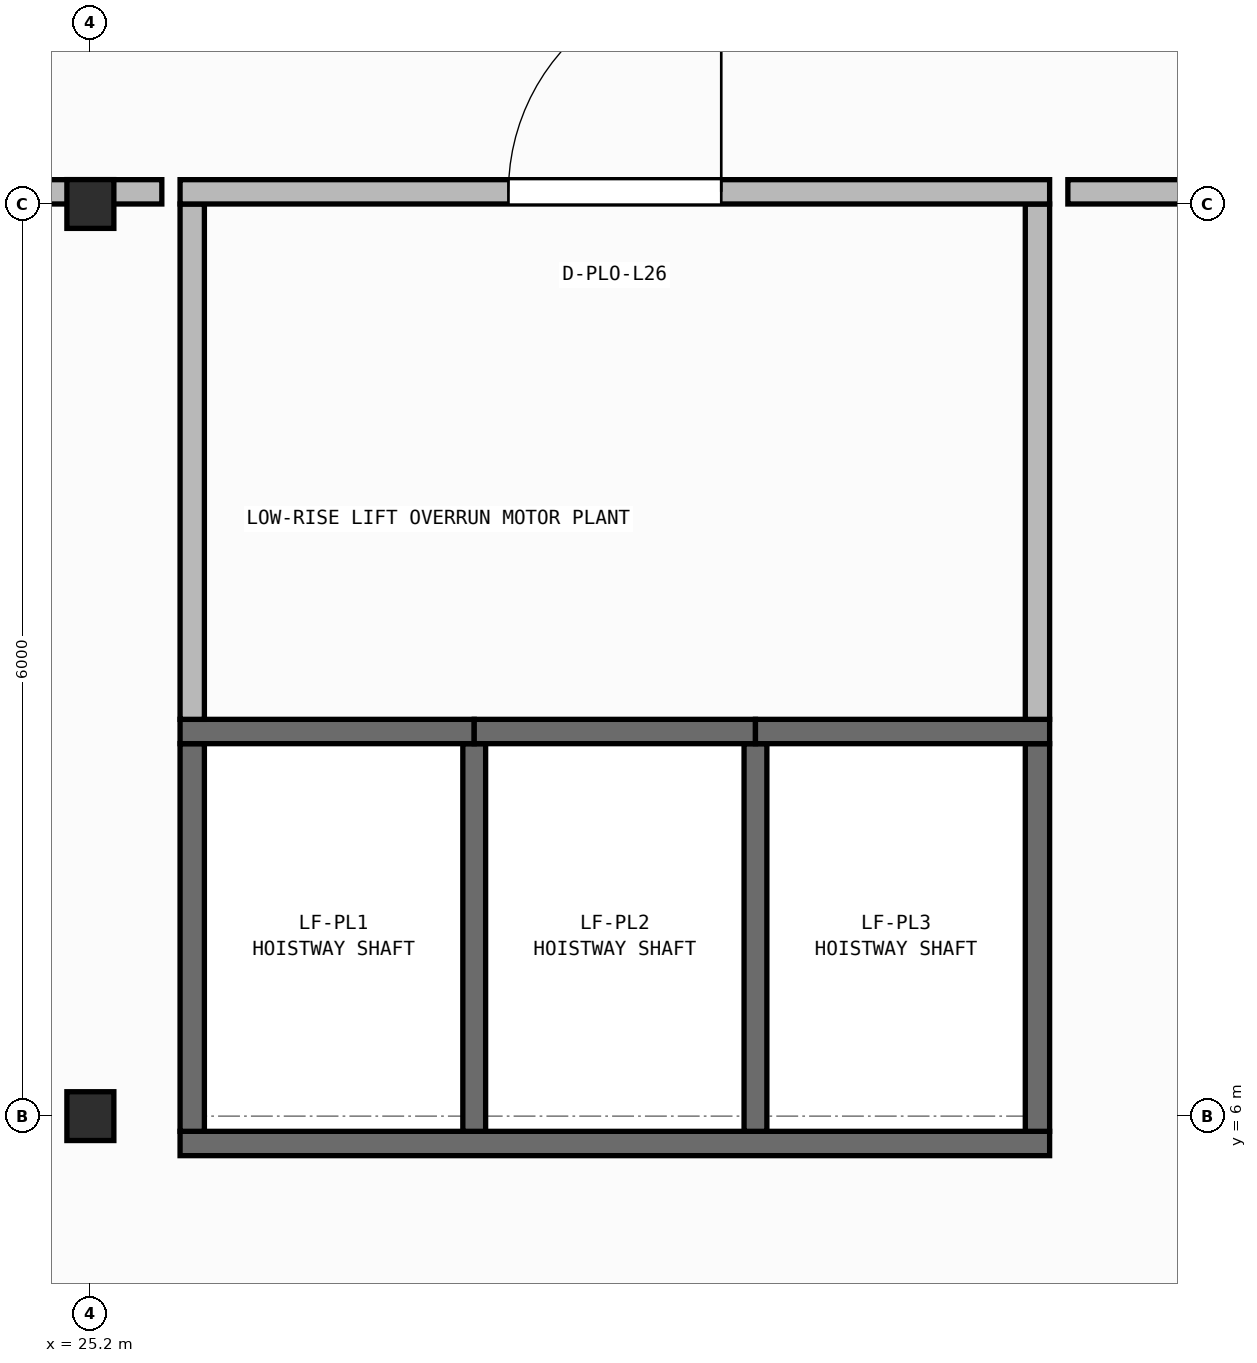
"""IFC4 building model, lengths in metres.
Left out: names, types, materials, properties, quantities, classifications, styles, units other than length and angle.
Written with IfcOpenShell. Run it as: python <this file> out.ifc"""

import sys

from ifc_helpers import new_model, si_unit, direction, frame, frame_2d, origin, origin_2d, place, context, subcontext, project, spatial, rectangle, i_section, extrude, element, fill, save


model = new_model("IFC4")
c1 = context("Model", 3, precision=1e-05, world=origin(), true_north=direction((0.0, 1.0)))
c2 = subcontext(c1, "Body", "Model", "MODEL_VIEW")
j1 = project(units=[si_unit("LENGTHUNIT", "METRE"), si_unit("PLANEANGLEUNIT", "RADIAN")], contexts=[c1])
p1 = place(None, origin())
s1 = spatial("IfcSite", under=j1, at=p1, CompositionType="ELEMENT")
p2 = place(p1, origin())
s2 = spatial("IfcBuilding", under=s1, at=p2, CompositionType="ELEMENT")
p3 = place(p2, frame((0.0, 0.0, 107.3)))
s3 = spatial("IfcBuildingStorey", under=s2, at=p3, CompositionType="ELEMENT", Elevation=107.3)
for number, where, z_axis, x_axis in (
    (1, (25.2, 6.0, 0.0), (0.0, 0.0, 1.0), (1.0, 0.0, 0.0)),
    (2, (25.2, 12.0, 0.0), (0.0, 0.0, 1.0), (1.0, 0.0, 0.0)),
):
    element("IfcColumn", number, at=place(p3, frame(where, z_axis=z_axis, x_axis=x_axis)), inside=s3, PredefinedType="COLUMN", context=c2, shape_type="SweptSolid", body=[
        extrude(i_section(OverallWidth=0.309, OverallDepth=0.321, WebThickness=0.014, FlangeThickness=0.022, FilletRadius=0.017, at=origin_2d()), origin(), (0.0, 0.0, 1.0), 3.95),
    ])
p4 = place(p3, frame((25.79, 5.82, 0.0), z_axis=(0.0, 0.0, 1.0), x_axis=(1.0, 0.0, 0.0)))
e3 = element("IfcWall", 3, at=p4, inside=s3, PredefinedType="SHEAR", context=c2, shape_type="SweptSolid", body=[
    extrude(rectangle(XDim=5.72, YDim=0.16, at=frame_2d((2.86, 0.0))), origin(), (0.0, 0.0, 1.0), 3.71),
])
for number, where, z_axis, x_axis in (
    (4, (25.87, 5.9, 0.0), (0.0, 0.0, 1.0), (0.0, 1.0, 0.0)),
    (5, (31.43, 5.9, 0.0), (0.0, 0.0, 1.0), (0.0, 1.0, 0.0)),
):
    element("IfcWall", number, at=place(p3, frame(where, z_axis=z_axis, x_axis=x_axis)), inside=s3, PredefinedType="SHEAR", context=c2, shape_type="SweptSolid", body=[
        extrude(rectangle(XDim=2.55, YDim=0.16, at=frame_2d((1.275, 0.0))), origin(), (0.0, 0.0, 1.0), 3.71),
    ])
for number, where, z_axis, x_axis in (
    (6, (27.725, 5.9, 0.0), (0.0, 0.0, 1.0), (0.0, 1.0, 0.0)),
    (7, (29.575, 5.9, 0.0), (0.0, 0.0, 1.0), (0.0, 1.0, 0.0)),
):
    element("IfcWall", number, at=place(p3, frame(where, z_axis=z_axis, x_axis=x_axis)), inside=s3, PredefinedType="SHEAR", context=c2, shape_type="SweptSolid", body=[
        extrude(rectangle(XDim=2.55, YDim=0.15, at=frame_2d((1.275, 0.0))), origin(), (0.0, 0.0, 1.0), 3.71),
    ])
p5 = place(p3, frame((25.79, 8.53, 0.0), z_axis=(0.0, 0.0, 1.0), x_axis=(1.0, 0.0, 0.0)))
e8 = element("IfcWall", 8, at=p5, inside=s3, PredefinedType="SHEAR", context=c2, shape_type="SweptSolid", body=[
    extrude(rectangle(XDim=1.935, YDim=0.16, at=frame_2d((0.968, 0.0))), origin(), (0.0, 0.0, 1.0), 3.71),
])
p6 = place(p3, frame((27.725, 8.53, 0.0), z_axis=(0.0, 0.0, 1.0), x_axis=(1.0, 0.0, 0.0)))
e9 = element("IfcWall", 9, at=p6, inside=s3, PredefinedType="SHEAR", context=c2, shape_type="SweptSolid", body=[
    extrude(rectangle(XDim=1.85, YDim=0.16, at=frame_2d((0.925, 0.0))), origin(), (0.0, 0.0, 1.0), 3.71),
])
p7 = place(p3, frame((29.575, 8.53, 0.0), z_axis=(0.0, 0.0, 1.0), x_axis=(1.0, 0.0, 0.0)))
e10 = element("IfcWall", 10, at=p7, inside=s3, PredefinedType="SHEAR", context=c2, shape_type="SweptSolid", body=[
    extrude(rectangle(XDim=1.935, YDim=0.16, at=frame_2d((0.968, 0.0))), origin(), (0.0, 0.0, 1.0), 3.71),
])
for number, where, z_axis, x_axis in (
    (11, (25.87, 8.61, 0.0), (0.0, 0.0, 1.0), (0.0, 1.0, 0.0)),
    (12, (31.43, 8.61, 0.0), (0.0, 0.0, 1.0), (0.0, 1.0, 0.0)),
):
    element("IfcWall", number, at=place(p3, frame(where, z_axis=z_axis, x_axis=x_axis)), inside=s3, PredefinedType="PARTITIONING", context=c2, shape_type="SweptSolid", body=[
        extrude(rectangle(XDim=3.39, YDim=0.16, at=frame_2d((1.695, 0.0))), origin(), (0.0, 0.0, 1.0), 3.71),
    ])
p8 = place(p3, frame((25.79, 12.08, 0.0), z_axis=(0.0, 0.0, 1.0), x_axis=(1.0, 0.0, 0.0)))
e13 = element("IfcWall", 13, at=p8, inside=s3, PredefinedType="PARTITIONING", context=c2, shape_type="SweptSolid", body=[
    extrude(rectangle(XDim=5.72, YDim=0.16, at=frame_2d((2.86, 0.0))), origin(), (0.0, 0.0, 1.0), 3.083),
])
p9 = place(p8, frame((2.16, 0.0, 0.0)))
e14 = element("IfcOpeningElement", 14, at=p9, cuts=e13, PredefinedType="OPENING", context=c2, shape_type="SweptSolid", body=[
    extrude(rectangle(XDim=1.4, YDim=2.15, at=frame_2d((0.7, 1.075))), frame((0.0, 0.09, 0.0), z_axis=(0.0, -1.0, 0.0), x_axis=(1.0, 0.0, 0.0)), (0.0, 0.0, 1.0), 0.18),
])
p10 = place(p3, frame((24.02, 12.08, 0.0), z_axis=(0.0, 0.0, 1.0), x_axis=(1.0, 0.0, 0.0)))
e15 = element("IfcWall", 15, at=p10, inside=s3, PredefinedType="PARTITIONING", context=c2, shape_type="SweptSolid", body=[
    extrude(rectangle(XDim=1.65, YDim=0.16, at=frame_2d((0.825, 0.0))), origin(), (0.0, 0.0, 1.0), 3.083),
])
p11 = place(p3, frame((31.63, 12.08, 0.0), z_axis=(0.0, 0.0, 1.0), x_axis=(1.0, 0.0, 0.0)))
e16 = element("IfcWall", 16, at=p11, inside=s3, PredefinedType="PARTITIONING", context=c2, shape_type="SweptSolid", body=[
    extrude(rectangle(XDim=2.44, YDim=0.16, at=frame_2d((1.22, 0.0))), origin(), (0.0, 0.0, 1.0), 3.083),
])
p12 = place(p9, origin())
e17 = element("IfcDoor", 17, at=p12, inside=s3, OperationType="SINGLE_SWING_RIGHT", PredefinedType="DOOR", context=c2, shape_type="SweptSolid", body=[
    extrude(rectangle(XDim=1.4, YDim=2.15, at=frame_2d((0.7, 1.075))), frame((0.0, 0.025, 0.0), z_axis=(0.0, -1.0, 0.0), x_axis=(1.0, 0.0, 0.0)), (0.0, 0.0, 1.0), 0.05),
])
fill(e14, e17)
save(model, sys.argv[1])
